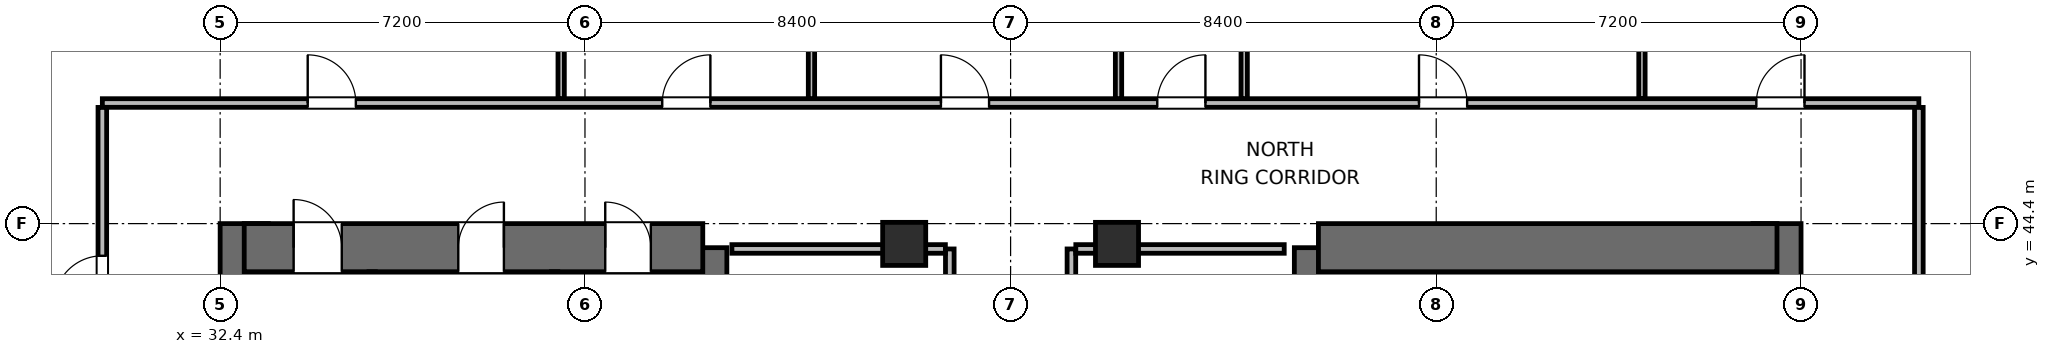
"""IFC4 building model, lengths in metres.
Left out: names, types, materials, properties, quantities, classifications, styles, units other than length and angle.
Written with IfcOpenShell. Run it as: python <this file> out.ifc"""

import sys

from ifc_helpers import new_model, si_unit, direction, frame, frame_2d, origin, origin_2d, place, context, subcontext, project, spatial, rectangle, extrude, element, fill, save


model = new_model("IFC4")
c1 = context("Model", 3, precision=1e-05, world=origin(), true_north=direction((0.0, 1.0)))
c2 = subcontext(c1, "Body", "Model", "MODEL_VIEW")
j1 = project(units=[si_unit("LENGTHUNIT", "METRE"), si_unit("PLANEANGLEUNIT", "RADIAN")], contexts=[c1])
p1 = place(None, origin())
s1 = spatial("IfcSite", under=j1, at=p1, CompositionType="ELEMENT")
p2 = place(p1, origin())
s2 = spatial("IfcBuilding", under=s1, at=p2, CompositionType="ELEMENT")
p3 = place(p2, frame((0.0, 0.0, 41.1)))
s3 = spatial("IfcBuildingStorey", under=s2, at=p3, CompositionType="ELEMENT", Elevation=41.1)
p4 = place(p3, frame((32.875, 27.6, 0.0), z_axis=(0.0, 0.0, 1.0), x_axis=(0.0, 1.0, 0.0)))
e1 = element("IfcWall", 1, at=p4, inside=s3, PredefinedType="SHEAR", context=c2, shape_type="SweptSolid", body=[
    extrude(rectangle(XDim=16.8, YDim=0.95, at=frame_2d((8.4, 0.0))), origin(), (0.0, 0.0, 1.0), 3.9),
])
p5 = place(p3, frame((41.925, 37.8, 0.0), z_axis=(0.0, 0.0, 1.0), x_axis=(0.0, 1.0, 0.0)))
e2 = element("IfcWall", 2, at=p5, inside=s3, PredefinedType="SHEAR", context=c2, shape_type="SweptSolid", body=[
    extrude(rectangle(XDim=6.125, YDim=0.95, at=frame_2d((3.062, 0.0))), origin(), (0.0, 0.0, 1.0), 3.9),
])
p6 = place(p3, frame((32.875, 43.925, 0.0), z_axis=(0.0, 0.0, 1.0), x_axis=(1.0, 0.0, 0.0)))
e3 = element("IfcWall", 3, at=p6, inside=s3, PredefinedType="SHEAR", context=c2, shape_type="SweptSolid", body=[
    extrude(rectangle(XDim=9.05, YDim=0.95, at=frame_2d((4.525, 0.0))), origin(), (0.0, 0.0, 1.0), 3.9),
])
p7 = place(p6, frame((0.975, 0.0, 0.0)))
e4 = element("IfcOpeningElement", 4, at=p7, cuts=e3, PredefinedType="OPENING", context=c2, shape_type="SweptSolid", body=[
    extrude(rectangle(XDim=0.95, YDim=2.04, at=frame_2d((0.475, 1.02))), frame((0.0, 0.485, 0.0), z_axis=(0.0, -1.0, 0.0), x_axis=(1.0, 0.0, 0.0)), (0.0, 0.0, 1.0), 0.97),
])
p8 = place(p6, frame((4.225, 0.0, 0.0)))
e5 = element("IfcOpeningElement", 5, at=p8, cuts=e3, PredefinedType="OPENING", context=c2, shape_type="SweptSolid", body=[
    extrude(rectangle(XDim=0.9, YDim=2.02, at=frame_2d((0.45, 1.01))), frame((0.0, 0.485, 0.0), z_axis=(0.0, -1.0, 0.0), x_axis=(1.0, 0.0, 0.0)), (0.0, 0.0, 1.0), 0.97),
])
p9 = place(p6, frame((7.125, 0.0, 0.0)))
e6 = element("IfcOpeningElement", 6, at=p9, cuts=e3, PredefinedType="OPENING", context=c2, shape_type="SweptSolid", body=[
    extrude(rectangle(XDim=0.9, YDim=2.02, at=frame_2d((0.45, 1.01))), frame((0.0, 0.485, 0.0), z_axis=(0.0, -1.0, 0.0), x_axis=(1.0, 0.0, 0.0)), (0.0, 0.0, 1.0), 0.97),
])
p10 = place(p3, frame((54.075, 38.0, 0.0), z_axis=(0.0, 0.0, 1.0), x_axis=(0.0, 1.0, 0.0)))
e7 = element("IfcWall", 7, at=p10, inside=s3, PredefinedType="SHEAR", context=c2, shape_type="SweptSolid", body=[
    extrude(rectangle(XDim=5.925, YDim=0.95, at=frame_2d((2.962, 0.0))), origin(), (0.0, 0.0, 1.0), 3.9),
])
p11 = place(p3, frame((63.125, 27.6, 0.0), z_axis=(0.0, 0.0, 1.0), x_axis=(0.0, 1.0, 0.0)))
e8 = element("IfcWall", 8, at=p11, inside=s3, PredefinedType="SHEAR", context=c2, shape_type="SweptSolid", body=[
    extrude(rectangle(XDim=16.8, YDim=0.95, at=frame_2d((8.4, 0.0))), origin(), (0.0, 0.0, 1.0), 3.9),
])
p12 = place(p3, frame((54.075, 43.925, 0.0), z_axis=(0.0, 0.0, 1.0), x_axis=(1.0, 0.0, 0.0)))
e9 = element("IfcWall", 9, at=p12, inside=s3, PredefinedType="SHEAR", context=c2, shape_type="SweptSolid", body=[
    extrude(rectangle(XDim=9.05, YDim=0.95, at=frame_2d((4.525, 0.0))), origin(), (0.0, 0.0, 1.0), 3.9),
])
for number, where, z_axis, x_axis in (
    (10, (45.9, 44.0, 0.0), (0.0, 0.0, 1.0), (1.0, 0.0, 0.0)),
    (11, (50.1, 44.0, 0.0), (0.0, 0.0, 1.0), (1.0, 0.0, 0.0)),
):
    element("IfcColumn", number, at=place(p3, frame(where, z_axis=z_axis, x_axis=x_axis)), inside=s3, PredefinedType="COLUMN", context=c2, shape_type="SweptSolid", body=[
        extrude(rectangle(XDim=0.85, YDim=0.85, at=origin_2d()), origin(), (0.0, 0.0, 1.0), 3.9),
    ])
for number, where, z_axis, x_axis in (
    (12, (35.4, 41.095, 0.0), (0.0, 0.0, 1.0), (0.0, 1.0, 0.0)),
    (13, (39.0, 41.095, 0.0), (0.0, 0.0, 1.0), (0.0, 1.0, 0.0)),
):
    element("IfcWall", number, at=place(p3, frame(where, z_axis=z_axis, x_axis=x_axis)), inside=s3, PredefinedType="PARTITIONING", context=c2, shape_type="SweptSolid", body=[
        extrude(rectangle(XDim=2.355, YDim=0.125, at=frame_2d((1.177, 0.0))), origin(), (0.0, 0.0, 1.0), 3.64),
    ])
p13 = place(p3, frame((46.8, 37.9, 0.0), z_axis=(0.0, 0.0, 1.0), x_axis=(0.0, 1.0, 0.0)))
e14 = element("IfcWall", 14, at=p13, inside=s3, PredefinedType="PARTITIONING", context=c2, shape_type="SweptSolid", body=[
    extrude(rectangle(XDim=6.0, YDim=0.17, at=frame_2d((3.0, 0.0))), origin(), (0.0, 0.0, 1.0), 3.64),
])
p14 = place(p13, frame((0.54, 0.0, 0.0)))
e15 = element("IfcOpeningElement", 15, at=p14, cuts=e14, PredefinedType="OPENING", context=c2, shape_type="SweptSolid", body=[
    extrude(rectangle(XDim=0.9, YDim=2.02, at=frame_2d((0.45, 1.01))), frame((0.0, 0.095, 0.0), z_axis=(0.0, -1.0, 0.0), x_axis=(1.0, 0.0, 0.0)), (0.0, 0.0, 1.0), 0.19),
])
p15 = place(p13, frame((2.55, 0.0, 0.0)))
e16 = element("IfcOpeningElement", 16, at=p15, cuts=e14, PredefinedType="OPENING", context=c2, shape_type="SweptSolid", body=[
    extrude(rectangle(XDim=0.9, YDim=2.02, at=frame_2d((0.45, 1.01))), frame((0.0, 0.095, 0.0), z_axis=(0.0, -1.0, 0.0), x_axis=(1.0, 0.0, 0.0)), (0.0, 0.0, 1.0), 0.19),
])
p16 = place(p13, frame((4.56, 0.0, 0.0)))
e17 = element("IfcOpeningElement", 17, at=p16, cuts=e14, PredefinedType="OPENING", context=c2, shape_type="SweptSolid", body=[
    extrude(rectangle(XDim=0.9, YDim=2.02, at=frame_2d((0.45, 1.01))), frame((0.0, 0.095, 0.0), z_axis=(0.0, -1.0, 0.0), x_axis=(1.0, 0.0, 0.0)), (0.0, 0.0, 1.0), 0.19),
])
p17 = place(p3, frame((42.5, 43.9, 0.0), z_axis=(0.0, 0.0, 1.0), x_axis=(1.0, 0.0, 0.0)))
e18 = element("IfcWall", 18, at=p17, inside=s3, PredefinedType="PARTITIONING", context=c2, shape_type="SweptSolid", body=[
    extrude(rectangle(XDim=4.213, YDim=0.17, at=frame_2d((2.106, 0.0))), origin(), (0.0, 0.0, 1.0), 2.525),
])
p18 = place(p3, frame((49.2, 37.9, 0.0), z_axis=(0.0, 0.0, 1.0), x_axis=(0.0, 1.0, 0.0)))
e19 = element("IfcWall", 19, at=p18, inside=s3, PredefinedType="PARTITIONING", context=c2, shape_type="SweptSolid", body=[
    extrude(rectangle(XDim=6.0, YDim=0.17, at=frame_2d((3.0, 0.0))), origin(), (0.0, 0.0, 1.0), 3.64),
])
p19 = place(p18, frame((0.69, 0.0, 0.0)))
e20 = element("IfcOpeningElement", 20, at=p19, cuts=e19, PredefinedType="OPENING", context=c2, shape_type="SweptSolid", body=[
    extrude(rectangle(XDim=0.9, YDim=2.02, at=frame_2d((0.45, 1.01))), frame((0.0, 0.095, 0.0), z_axis=(0.0, -1.0, 0.0), x_axis=(1.0, 0.0, 0.0)), (0.0, 0.0, 1.0), 0.19),
])
p20 = place(p18, frame((3.69, 0.0, 0.0)))
e21 = element("IfcOpeningElement", 21, at=p20, cuts=e19, PredefinedType="OPENING", context=c2, shape_type="SweptSolid", body=[
    extrude(rectangle(XDim=0.9, YDim=2.02, at=frame_2d((0.45, 1.01))), frame((0.0, 0.095, 0.0), z_axis=(0.0, -1.0, 0.0), x_axis=(1.0, 0.0, 0.0)), (0.0, 0.0, 1.0), 0.19),
])
p21 = place(p3, frame((49.287, 43.9, 0.0), z_axis=(0.0, 0.0, 1.0), x_axis=(1.0, 0.0, 0.0)))
e22 = element("IfcWall", 22, at=p21, inside=s3, PredefinedType="PARTITIONING", context=c2, shape_type="SweptSolid", body=[
    extrude(rectangle(XDim=4.113, YDim=0.17, at=frame_2d((2.056, 0.0))), origin(), (0.0, 0.0, 1.0), 2.525),
])
p22 = place(p3, frame((30.075, 46.78, 0.0), z_axis=(0.0, 0.0, 1.0), x_axis=(1.0, 0.0, 0.0)))
e23 = element("IfcWall", 23, at=p22, inside=s3, PredefinedType="PARTITIONING", context=c2, shape_type="SweptSolid", body=[
    extrude(rectangle(XDim=35.85, YDim=0.17, at=frame_2d((17.925, 0.0))), origin(), (0.0, 0.0, 1.0), 3.64),
])
p23 = place(p22, frame((4.053, 0.0, 0.0)))
e24 = element("IfcOpeningElement", 24, at=p23, cuts=e23, PredefinedType="OPENING", context=c2, shape_type="SweptSolid", body=[
    extrude(rectangle(XDim=0.95, YDim=2.04, at=frame_2d((0.475, 1.02))), frame((0.0, 0.095, 0.0), z_axis=(0.0, -1.0, 0.0), x_axis=(1.0, 0.0, 0.0)), (0.0, 0.0, 1.0), 0.19),
])
p24 = place(p22, frame((11.05, 0.0, 0.0)))
e25 = element("IfcOpeningElement", 25, at=p24, cuts=e23, PredefinedType="OPENING", context=c2, shape_type="SweptSolid", body=[
    extrude(rectangle(XDim=0.95, YDim=2.04, at=frame_2d((0.475, 1.02))), frame((0.0, 0.095, 0.0), z_axis=(0.0, -1.0, 0.0), x_axis=(1.0, 0.0, 0.0)), (0.0, 0.0, 1.0), 0.19),
])
p25 = place(p22, frame((16.55, 0.0, 0.0)))
e26 = element("IfcOpeningElement", 26, at=p25, cuts=e23, PredefinedType="OPENING", context=c2, shape_type="SweptSolid", body=[
    extrude(rectangle(XDim=0.95, YDim=2.04, at=frame_2d((0.475, 1.02))), frame((0.0, 0.095, 0.0), z_axis=(0.0, -1.0, 0.0), x_axis=(1.0, 0.0, 0.0)), (0.0, 0.0, 1.0), 0.19),
])
p26 = place(p22, frame((20.82, 0.0, 0.0)))
e27 = element("IfcOpeningElement", 27, at=p26, cuts=e23, PredefinedType="OPENING", context=c2, shape_type="SweptSolid", body=[
    extrude(rectangle(XDim=0.95, YDim=2.04, at=frame_2d((0.475, 1.02))), frame((0.0, 0.095, 0.0), z_axis=(0.0, -1.0, 0.0), x_axis=(1.0, 0.0, 0.0)), (0.0, 0.0, 1.0), 0.19),
])
p27 = place(p22, frame((25.985, 0.0, 0.0)))
e28 = element("IfcOpeningElement", 28, at=p27, cuts=e23, PredefinedType="OPENING", context=c2, shape_type="SweptSolid", body=[
    extrude(rectangle(XDim=0.95, YDim=2.04, at=frame_2d((0.475, 1.02))), frame((0.0, 0.095, 0.0), z_axis=(0.0, -1.0, 0.0), x_axis=(1.0, 0.0, 0.0)), (0.0, 0.0, 1.0), 0.19),
])
p28 = place(p22, frame((32.643, 0.0, 0.0)))
e29 = element("IfcOpeningElement", 29, at=p28, cuts=e23, PredefinedType="OPENING", context=c2, shape_type="SweptSolid", body=[
    extrude(rectangle(XDim=0.95, YDim=2.04, at=frame_2d((0.475, 1.02))), frame((0.0, 0.095, 0.0), z_axis=(0.0, -1.0, 0.0), x_axis=(1.0, 0.0, 0.0)), (0.0, 0.0, 1.0), 0.19),
])
p29 = place(p3, frame((30.075, 25.307, 0.0), z_axis=(0.0, 0.0, 1.0), x_axis=(0.0, 1.0, 0.0)))
e30 = element("IfcWall", 30, at=p29, inside=s3, PredefinedType="PARTITIONING", context=c2, shape_type="SweptSolid", body=[
    extrude(rectangle(XDim=21.386, YDim=0.17, at=frame_2d((10.693, 0.0))), origin(), (0.0, 0.0, 1.0), 3.64),
])
p30 = place(p29, frame((3.528, 0.0, 0.0)))
e31 = element("IfcOpeningElement", 31, at=p30, cuts=e30, PredefinedType="OPENING", context=c2, shape_type="SweptSolid", body=[
    extrude(rectangle(XDim=0.95, YDim=2.04, at=frame_2d((0.475, 1.02))), frame((0.0, 0.095, 0.0), z_axis=(0.0, -1.0, 0.0), x_axis=(1.0, 0.0, 0.0)), (0.0, 0.0, 1.0), 0.19),
])
p31 = place(p29, frame((10.818, 0.0, 0.0)))
e32 = element("IfcOpeningElement", 32, at=p31, cuts=e30, PredefinedType="OPENING", context=c2, shape_type="SweptSolid", body=[
    extrude(rectangle(XDim=0.95, YDim=2.04, at=frame_2d((0.475, 1.02))), frame((0.0, 0.095, 0.0), z_axis=(0.0, -1.0, 0.0), x_axis=(1.0, 0.0, 0.0)), (0.0, 0.0, 1.0), 0.19),
])
p32 = place(p29, frame((17.508, 0.0, 0.0)))
e33 = element("IfcOpeningElement", 33, at=p32, cuts=e30, PredefinedType="OPENING", context=c2, shape_type="SweptSolid", body=[
    extrude(rectangle(XDim=0.95, YDim=2.04, at=frame_2d((0.475, 1.02))), frame((0.0, 0.095, 0.0), z_axis=(0.0, -1.0, 0.0), x_axis=(1.0, 0.0, 0.0)), (0.0, 0.0, 1.0), 0.19),
])
p33 = place(p3, frame((65.925, 25.307, 0.0), z_axis=(0.0, 0.0, 1.0), x_axis=(0.0, 1.0, 0.0)))
e34 = element("IfcWall", 34, at=p33, inside=s3, PredefinedType="PARTITIONING", context=c2, shape_type="SweptSolid", body=[
    extrude(rectangle(XDim=21.386, YDim=0.17, at=frame_2d((10.693, 0.0))), origin(), (0.0, 0.0, 1.0), 3.64),
])
p34 = place(p33, frame((5.428, 0.0, 0.0)))
e35 = element("IfcOpeningElement", 35, at=p34, cuts=e34, PredefinedType="OPENING", context=c2, shape_type="SweptSolid", body=[
    extrude(rectangle(XDim=0.95, YDim=2.04, at=frame_2d((0.475, 1.02))), frame((0.0, 0.095, 0.0), z_axis=(0.0, -1.0, 0.0), x_axis=(1.0, 0.0, 0.0)), (0.0, 0.0, 1.0), 0.19),
])
p35 = place(p33, frame((16.208, 0.0, 0.0)))
e36 = element("IfcOpeningElement", 36, at=p35, cuts=e34, PredefinedType="OPENING", context=c2, shape_type="SweptSolid", body=[
    extrude(rectangle(XDim=0.95, YDim=2.04, at=frame_2d((0.475, 1.02))), frame((0.0, 0.095, 0.0), z_axis=(0.0, -1.0, 0.0), x_axis=(1.0, 0.0, 0.0)), (0.0, 0.0, 1.0), 0.19),
])
p36 = place(p3, frame((39.13, 46.867, 0.0), z_axis=(0.0, 0.0, 1.0), x_axis=(0.0, 1.0, 0.0)))
e37 = element("IfcWall", 37, at=p36, inside=s3, PredefinedType="PARTITIONING", context=c2, shape_type="SweptSolid", body=[
    extrude(rectangle(XDim=15.288, YDim=0.125, at=frame_2d((7.644, 0.0))), origin(), (0.0, 0.0, 1.0), 3.64),
])
p37 = place(p3, frame((44.07, 46.867, 0.0), z_axis=(0.0, 0.0, 1.0), x_axis=(0.0, 1.0, 0.0)))
e38 = element("IfcWall", 38, at=p37, inside=s3, PredefinedType="PARTITIONING", context=c2, shape_type="SweptSolid", body=[
    extrude(rectangle(XDim=13.618, YDim=0.125, at=frame_2d((6.809, 0.0))), origin(), (0.0, 0.0, 1.0), 3.003),
])
p38 = place(p3, frame((50.13, 46.867, 0.0), z_axis=(0.0, 0.0, 1.0), x_axis=(0.0, 1.0, 0.0)))
e39 = element("IfcWall", 39, at=p38, inside=s3, PredefinedType="PARTITIONING", context=c2, shape_type="SweptSolid", body=[
    extrude(rectangle(XDim=11.558, YDim=0.125, at=frame_2d((5.779, 0.0))), origin(), (0.0, 0.0, 1.0), 3.64),
])
p39 = place(p3, frame((52.61, 46.867, 0.0), z_axis=(0.0, 0.0, 1.0), x_axis=(0.0, 1.0, 0.0)))
e40 = element("IfcWall", 40, at=p39, inside=s3, PredefinedType="PARTITIONING", context=c2, shape_type="SweptSolid", body=[
    extrude(rectangle(XDim=11.558, YDim=0.125, at=frame_2d((5.779, 0.0))), origin(), (0.0, 0.0, 1.0), 3.003),
])
p40 = place(p3, frame((60.46, 46.867, 0.0), z_axis=(0.0, 0.0, 1.0), x_axis=(0.0, 1.0, 0.0)))
e41 = element("IfcWall", 41, at=p40, inside=s3, PredefinedType="PARTITIONING", context=c2, shape_type="SweptSolid", body=[
    extrude(rectangle(XDim=15.218, YDim=0.125, at=frame_2d((7.609, 0.0))), origin(), (0.0, 0.0, 1.0), 3.64),
])
p41 = place(p7, origin())
e42 = element("IfcDoor", 42, at=p41, inside=s3, OperationType="SINGLE_SWING_LEFT", PredefinedType="DOOR", context=c2, shape_type="SweptSolid", body=[
    extrude(rectangle(XDim=0.95, YDim=2.04, at=frame_2d((0.475, 1.02))), frame((0.0, 0.025, 0.0), z_axis=(0.0, -1.0, 0.0), x_axis=(1.0, 0.0, 0.0)), (0.0, 0.0, 1.0), 0.05),
])
fill(e4, e42)
p42 = place(p8, origin())
e43 = element("IfcDoor", 43, at=p42, inside=s3, OperationType="SINGLE_SWING_RIGHT", PredefinedType="DOOR", context=c2, shape_type="SweptSolid", body=[
    extrude(rectangle(XDim=0.9, YDim=2.02, at=frame_2d((0.45, 1.01))), frame((0.0, 0.025, 0.0), z_axis=(0.0, -1.0, 0.0), x_axis=(1.0, 0.0, 0.0)), (0.0, 0.0, 1.0), 0.05),
])
fill(e5, e43)
p43 = place(p9, origin())
e44 = element("IfcDoor", 44, at=p43, inside=s3, OperationType="SINGLE_SWING_LEFT", PredefinedType="DOOR", context=c2, shape_type="SweptSolid", body=[
    extrude(rectangle(XDim=0.9, YDim=2.02, at=frame_2d((0.45, 1.01))), frame((0.0, 0.025, 0.0), z_axis=(0.0, -1.0, 0.0), x_axis=(1.0, 0.0, 0.0)), (0.0, 0.0, 1.0), 0.05),
])
fill(e6, e44)
p44 = place(p23, origin())
e45 = element("IfcDoor", 45, at=p44, inside=s3, OperationType="SINGLE_SWING_LEFT", PredefinedType="DOOR", context=c2, shape_type="SweptSolid", body=[
    extrude(rectangle(XDim=0.95, YDim=2.04, at=frame_2d((0.475, 1.02))), frame((0.0, 0.025, 0.0), z_axis=(0.0, -1.0, 0.0), x_axis=(1.0, 0.0, 0.0)), (0.0, 0.0, 1.0), 0.05),
])
fill(e24, e45)
p45 = place(p24, origin())
e46 = element("IfcDoor", 46, at=p45, inside=s3, OperationType="SINGLE_SWING_RIGHT", PredefinedType="DOOR", context=c2, shape_type="SweptSolid", body=[
    extrude(rectangle(XDim=0.95, YDim=2.04, at=frame_2d((0.475, 1.02))), frame((0.0, 0.025, 0.0), z_axis=(0.0, -1.0, 0.0), x_axis=(1.0, 0.0, 0.0)), (0.0, 0.0, 1.0), 0.05),
])
fill(e25, e46)
p46 = place(p25, origin())
e47 = element("IfcDoor", 47, at=p46, inside=s3, OperationType="SINGLE_SWING_LEFT", PredefinedType="DOOR", context=c2, shape_type="SweptSolid", body=[
    extrude(rectangle(XDim=0.95, YDim=2.04, at=frame_2d((0.475, 1.02))), frame((0.0, 0.025, 0.0), z_axis=(0.0, -1.0, 0.0), x_axis=(1.0, 0.0, 0.0)), (0.0, 0.0, 1.0), 0.05),
])
fill(e26, e47)
p47 = place(p26, origin())
e48 = element("IfcDoor", 48, at=p47, inside=s3, OperationType="SINGLE_SWING_RIGHT", PredefinedType="DOOR", context=c2, shape_type="SweptSolid", body=[
    extrude(rectangle(XDim=0.95, YDim=2.04, at=frame_2d((0.475, 1.02))), frame((0.0, 0.025, 0.0), z_axis=(0.0, -1.0, 0.0), x_axis=(1.0, 0.0, 0.0)), (0.0, 0.0, 1.0), 0.05),
])
fill(e27, e48)
p48 = place(p27, origin())
e49 = element("IfcDoor", 49, at=p48, inside=s3, OperationType="SINGLE_SWING_LEFT", PredefinedType="DOOR", context=c2, shape_type="SweptSolid", body=[
    extrude(rectangle(XDim=0.95, YDim=2.04, at=frame_2d((0.475, 1.02))), frame((0.0, 0.025, 0.0), z_axis=(0.0, -1.0, 0.0), x_axis=(1.0, 0.0, 0.0)), (0.0, 0.0, 1.0), 0.05),
])
fill(e28, e49)
p49 = place(p28, origin())
e50 = element("IfcDoor", 50, at=p49, inside=s3, OperationType="SINGLE_SWING_RIGHT", PredefinedType="DOOR", context=c2, shape_type="SweptSolid", body=[
    extrude(rectangle(XDim=0.95, YDim=2.04, at=frame_2d((0.475, 1.02))), frame((0.0, 0.025, 0.0), z_axis=(0.0, -1.0, 0.0), x_axis=(1.0, 0.0, 0.0)), (0.0, 0.0, 1.0), 0.05),
])
fill(e29, e50)
p50 = place(p32, origin())
e51 = element("IfcDoor", 51, at=p50, inside=s3, OperationType="SINGLE_SWING_LEFT", PredefinedType="DOOR", context=c2, shape_type="SweptSolid", body=[
    extrude(rectangle(XDim=0.95, YDim=2.04, at=frame_2d((0.475, 1.02))), frame((0.0, 0.025, 0.0), z_axis=(0.0, -1.0, 0.0), x_axis=(1.0, 0.0, 0.0)), (0.0, 0.0, 1.0), 0.05),
])
fill(e33, e51)
save(model, sys.argv[1])
